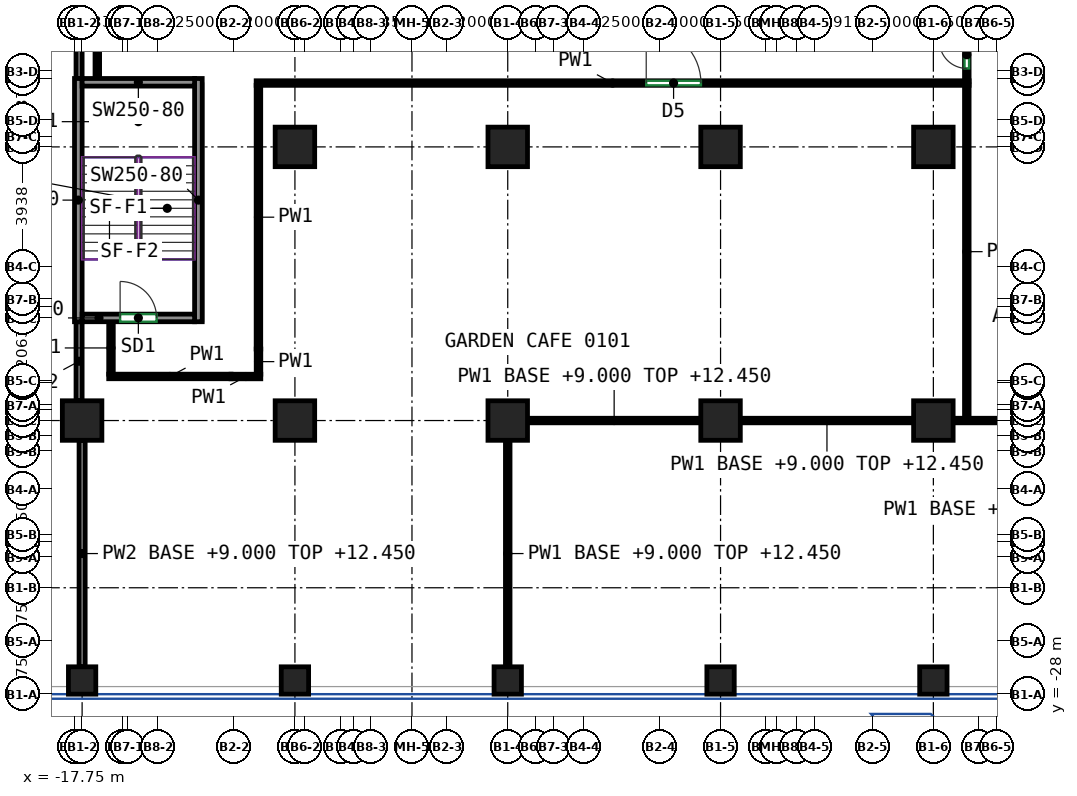
"""IFC4 building model, lengths in metres.
Left out: names, types, materials, properties, quantities, classifications, styles, units other than length and angle.
Written with IfcOpenShell. Run it as: python <this file> out.ifc"""

import sys

from ifc_helpers import new_model, si_unit, direction, frame, frame_2d, origin, origin_2d, place, context, subcontext, project, spatial, rectangle, extrude, source, transform, mapped, element, fill, save


model = new_model("IFC4")
c1 = context("Model", 3, precision=1e-05, world=origin(), true_north=direction((0.0, 1.0)))
c2 = subcontext(c1, "Body", "Model", "MODEL_VIEW")
j1 = project(units=[si_unit("LENGTHUNIT", "METRE"), si_unit("PLANEANGLEUNIT", "RADIAN")], contexts=[c1])
p1 = place(None, origin())
s1 = spatial("IfcSite", under=j1, at=p1, CompositionType="ELEMENT")
p2 = place(p1, origin())
s2 = spatial("IfcBuilding", under=s1, at=p2, CompositionType="ELEMENT")
p3 = place(p2, frame((0.0, 0.0, 9.0)))
s3 = spatial("IfcBuildingStorey", under=s2, at=p3, CompositionType="ELEMENT", Elevation=9.0)
m1 = source(origin(), c2, "Body", "SweptSolid", [
    extrude(rectangle(XDim=0.9, YDim=0.9, at=origin_2d()), origin(), (0.0, 0.0, 1.0), 4.1),
])
p4 = place(p3, frame((-17.5, -27.55, 0.0), z_axis=(0.0, 0.0, 1.0), x_axis=(1.0, 0.0, 0.0)))
e1 = element("IfcColumn", 1, at=p4, inside=s3, PredefinedType="COLUMN", context=c2, shape_type="MappedRepresentation", body=[
    mapped(m1, transform((0.0, 0.0, 0.0))),
])
m2 = source(origin(), c2, "Body", "SweptSolid", [
    extrude(rectangle(XDim=1.3, YDim=1.3, at=origin_2d()), origin(), (0.0, 0.0, 1.0), 4.1),
])
p5 = place(p3, frame((-17.5, -19.0, 0.0), z_axis=(0.0, 0.0, 1.0), x_axis=(1.0, 0.0, 0.0)))
e2 = element("IfcColumn", 2, at=p5, inside=s3, PredefinedType="COLUMN", context=c2, shape_type="MappedRepresentation", body=[
    mapped(m2, transform((0.0, 0.0, 0.0))),
])
p6 = place(p3, frame((-10.5, -27.55, 0.0), z_axis=(0.0, 0.0, 1.0), x_axis=(1.0, 0.0, 0.0)))
e3 = element("IfcColumn", 3, at=p6, inside=s3, PredefinedType="COLUMN", context=c2, shape_type="MappedRepresentation", body=[
    mapped(m1, transform((0.0, 0.0, 0.0))),
])
for number, where, z_axis, x_axis in (
    (4, (-10.5, -19.0, 0.0), (0.0, 0.0, 1.0), (1.0, 0.0, 0.0)),
    (5, (-10.5, -10.0, 0.0), (0.0, 0.0, 1.0), (1.0, 0.0, 0.0)),
):
    element("IfcColumn", number, at=place(p3, frame(where, z_axis=z_axis, x_axis=x_axis)), inside=s3, PredefinedType="COLUMN", context=c2, shape_type="MappedRepresentation", body=[
        mapped(m2, transform((0.0, 0.0, 0.0))),
    ])
p7 = place(p3, frame((-3.5, -27.55, 0.0), z_axis=(0.0, 0.0, 1.0), x_axis=(1.0, 0.0, 0.0)))
e6 = element("IfcColumn", 6, at=p7, inside=s3, PredefinedType="COLUMN", context=c2, shape_type="MappedRepresentation", body=[
    mapped(m1, transform((0.0, 0.0, 0.0))),
])
for number, where, z_axis, x_axis in (
    (7, (-3.5, -19.0, 0.0), (0.0, 0.0, 1.0), (1.0, 0.0, 0.0)),
    (8, (-3.5, -10.0, 0.0), (0.0, 0.0, 1.0), (1.0, 0.0, 0.0)),
):
    element("IfcColumn", number, at=place(p3, frame(where, z_axis=z_axis, x_axis=x_axis)), inside=s3, PredefinedType="COLUMN", context=c2, shape_type="MappedRepresentation", body=[
        mapped(m2, transform((0.0, 0.0, 0.0))),
    ])
p8 = place(p3, frame((3.5, -27.55, 0.0), z_axis=(0.0, 0.0, 1.0), x_axis=(1.0, 0.0, 0.0)))
e9 = element("IfcColumn", 9, at=p8, inside=s3, PredefinedType="COLUMN", context=c2, shape_type="MappedRepresentation", body=[
    mapped(m1, transform((0.0, 0.0, 0.0))),
])
for number, where, z_axis, x_axis in (
    (10, (3.5, -19.0, 0.0), (0.0, 0.0, 1.0), (1.0, 0.0, 0.0)),
    (11, (3.5, -10.0, 0.0), (0.0, 0.0, 1.0), (1.0, 0.0, 0.0)),
):
    element("IfcColumn", number, at=place(p3, frame(where, z_axis=z_axis, x_axis=x_axis)), inside=s3, PredefinedType="COLUMN", context=c2, shape_type="MappedRepresentation", body=[
        mapped(m2, transform((0.0, 0.0, 0.0))),
    ])
p9 = place(p3, frame((10.5, -27.55, 0.0), z_axis=(0.0, 0.0, 1.0), x_axis=(1.0, 0.0, 0.0)))
e12 = element("IfcColumn", 12, at=p9, inside=s3, PredefinedType="COLUMN", context=c2, shape_type="MappedRepresentation", body=[
    mapped(m1, transform((0.0, 0.0, 0.0))),
])
for number, where, z_axis, x_axis in (
    (13, (10.5, -19.0, 0.0), (0.0, 0.0, 1.0), (1.0, 0.0, 0.0)),
    (14, (10.5, -10.0, 0.0), (0.0, 0.0, 1.0), (1.0, 0.0, 0.0)),
):
    element("IfcColumn", number, at=place(p3, frame(where, z_axis=z_axis, x_axis=x_axis)), inside=s3, PredefinedType="COLUMN", context=c2, shape_type="MappedRepresentation", body=[
        mapped(m2, transform((0.0, 0.0, 0.0))),
    ])
m3 = source(origin(), c2, "Body", "SweptSolid", [
    extrude(rectangle(XDim=8.0, YDim=0.25, at=frame_2d((4.0, 0.0))), origin(), (0.0, 0.0, 1.0), 4.1),
])
for number, where, z_axis, x_axis in (
    (15, (-17.625, -15.75, 0.0), (0.0, 0.0, 1.0), (0.0, 1.0, 0.0)),
    (16, (-13.675, -15.75, 0.0), (0.0, 0.0, 1.0), (0.0, 1.0, 0.0)),
):
    element("IfcWall", number, at=place(p3, frame(where, z_axis=z_axis, x_axis=x_axis)), inside=s3, PredefinedType="SHEAR", context=c2, shape_type="MappedRepresentation", body=[
        mapped(m3, transform((0.0, 0.0, 0.0))),
    ])
m4 = source(origin(), c2, "Body", "SweptSolid", [
    extrude(rectangle(XDim=3.7, YDim=0.25, at=frame_2d((1.85, 0.0))), origin(), (0.0, 0.0, 1.0), 4.1),
])
p10 = place(p3, frame((-17.5, -15.625, 0.0), z_axis=(0.0, 0.0, 1.0), x_axis=(1.0, 0.0, 0.0)))
e17 = element("IfcWall", 17, at=p10, inside=s3, PredefinedType="SHEAR", context=c2, shape_type="MappedRepresentation", body=[
    mapped(m4, transform((0.0, 0.0, 0.0))),
])
p11 = place(p10, frame((1.25, 0.0, 0.0)))
e18 = element("IfcOpeningElement", 18, at=p11, cuts=e17, PredefinedType="OPENING", context=c2, shape_type="SweptSolid", body=[
    extrude(rectangle(XDim=1.2, YDim=2.1, at=frame_2d((0.6, 1.05))), frame((0.0, 0.135, 0.0), z_axis=(0.0, -1.0, 0.0), x_axis=(1.0, 0.0, 0.0)), (0.0, 0.0, 1.0), 0.27),
])
p12 = place(p3, frame((-17.5, -7.875, 0.0), z_axis=(0.0, 0.0, 1.0), x_axis=(1.0, 0.0, 0.0)))
e19 = element("IfcWall", 19, at=p12, inside=s3, PredefinedType="SHEAR", context=c2, shape_type="MappedRepresentation", body=[
    mapped(m4, transform((0.0, 0.0, 0.0))),
])
p13 = place(p3, frame((-3.5, -27.1, 0.0), z_axis=(0.0, 0.0, 1.0), x_axis=(0.0, 1.0, 0.0)))
e20 = element("IfcWall", 20, at=p13, inside=s3, PredefinedType="PARTITIONING", context=c2, shape_type="SweptSolid", body=[
    extrude(rectangle(XDim=7.45, YDim=0.15, at=frame_2d((3.725, 0.0))), origin(), (0.0, 0.0, 1.0), 3.45),
])
for number, where, z_axis, x_axis in (
    (21, (-2.85, -19.0, 0.0), (0.0, 0.0, 1.0), (1.0, 0.0, 0.0)),
    (22, (4.15, -19.0, 0.0), (0.0, 0.0, 1.0), (1.0, 0.0, 0.0)),
    (23, (11.15, -19.0, 0.0), (0.0, 0.0, 1.0), (1.0, 0.0, 0.0)),
):
    element("IfcWall", number, at=place(p3, frame(where, z_axis=z_axis, x_axis=x_axis)), inside=s3, PredefinedType="PARTITIONING", context=c2, shape_type="SweptSolid", body=[
        extrude(rectangle(XDim=5.7, YDim=0.15, at=frame_2d((2.85, 0.0))), origin(), (0.0, 0.0, 1.0), 3.45),
    ])
p14 = place(p3, frame((11.6, -7.835, 0.0), z_axis=(0.0, 0.0, 1.0), x_axis=(0.0, 1.0, 0.0)))
e24 = element("IfcWall", 24, at=p14, inside=s3, PredefinedType="PARTITIONING", context=c2, shape_type="SweptSolid", body=[
    extrude(rectangle(XDim=2.27, YDim=0.15, at=frame_2d((1.135, 0.0))), origin(), (0.0, 0.0, 1.0), 4.1),
])
p15 = place(p14, frame((0.416, 0.0, 0.0)))
e25 = element("IfcOpeningElement", 25, at=p15, cuts=e24, PredefinedType="OPENING", context=c2, shape_type="SweptSolid", body=[
    extrude(rectangle(XDim=0.9, YDim=2.1, at=frame_2d((0.45, 1.05))), frame((0.0, 0.085, 0.0), z_axis=(0.0, -1.0, 0.0), x_axis=(1.0, 0.0, 0.0)), (0.0, 0.0, 1.0), 0.17),
])
p16 = place(p3, frame((11.6, -18.925, 0.0), z_axis=(0.0, 0.0, 1.0), x_axis=(0.0, 1.0, 0.0)))
e26 = element("IfcWall", 26, at=p16, inside=s3, PredefinedType="PARTITIONING", context=c2, shape_type="SweptSolid", body=[
    extrude(rectangle(XDim=10.959, YDim=0.15, at=frame_2d((5.479, 0.0))), origin(), (0.0, 0.0, 1.0), 4.1),
])
p17 = place(p3, frame((-16.625, -17.55, 0.0), z_axis=(0.0, 0.0, 1.0), x_axis=(1.0, 0.0, 0.0)))
e27 = element("IfcWall", 27, at=p17, inside=s3, PredefinedType="PARTITIONING", context=c2, shape_type="SweptSolid", body=[
    extrude(rectangle(XDim=4.023, YDim=0.15, at=frame_2d((2.011, 0.0))), origin(), (0.0, 0.0, 1.0), 4.1),
])
p18 = place(p3, frame((-16.55, -15.75, 0.0), z_axis=(0.0, 0.0, 1.0), x_axis=(0.0, -1.0, 0.0)))
e28 = element("IfcWall", 28, at=p18, inside=s3, PredefinedType="PARTITIONING", context=c2, shape_type="SweptSolid", body=[
    extrude(rectangle(XDim=1.725, YDim=0.15, at=frame_2d((0.863, 0.0))), origin(), (0.0, 0.0, 1.0), 4.1),
])
p19 = place(p3, frame((-11.775, -7.9, 0.0), z_axis=(0.0, 0.0, 1.0), x_axis=(1.0, 0.0, 0.0)))
e29 = element("IfcWall", 29, at=p19, inside=s3, PredefinedType="PARTITIONING", context=c2, shape_type="SweptSolid", body=[
    extrude(rectangle(XDim=23.45, YDim=0.15, at=frame_2d((11.725, 0.0))), origin(), (0.0, 0.0, 1.0), 4.1),
])
p20 = place(p19, frame((12.83, 0.0, 0.0)))
e30 = element("IfcOpeningElement", 30, at=p20, cuts=e29, PredefinedType="OPENING", context=c2, shape_type="SweptSolid", body=[
    extrude(rectangle(XDim=1.8, YDim=2.1, at=frame_2d((0.9, 1.05))), frame((0.0, 0.085, 0.0), z_axis=(0.0, -1.0, 0.0), x_axis=(1.0, 0.0, 0.0)), (0.0, 0.0, 1.0), 0.17),
])
p21 = place(p3, frame((-11.7, -16.648, 0.0), z_axis=(0.0, 0.0, 1.0), x_axis=(0.0, 1.0, 0.0)))
e31 = element("IfcWall", 31, at=p21, inside=s3, PredefinedType="PARTITIONING", context=c2, shape_type="SweptSolid", body=[
    extrude(rectangle(XDim=8.673, YDim=0.15, at=frame_2d((4.336, 0.0))), origin(), (0.0, 0.0, 1.0), 4.1),
])
p22 = place(p3, frame((-11.698, -17.477, 0.0), z_axis=(0.0, 0.0, 1.0), x_axis=(0.0, 1.0, 0.0)))
e32 = element("IfcWall", 32, at=p22, inside=s3, PredefinedType="PARTITIONING", context=c2, shape_type="SweptSolid", body=[
    extrude(rectangle(XDim=0.829, YDim=0.15, at=frame_2d((0.415, 0.0))), origin(), (0.0, 0.0, 1.0), 4.1),
])
p23 = place(p3, frame((-12.602, -17.552, 0.0), z_axis=(0.0, 0.0, 1.0), x_axis=(1.0, 0.0, 0.0)))
e33 = element("IfcWall", 33, at=p23, inside=s3, PredefinedType="PARTITIONING", context=c2, shape_type="SweptSolid", body=[
    extrude(rectangle(XDim=0.979, YDim=0.15, at=frame_2d((0.49, 0.0))), origin(), (0.0, 0.0, 1.0), 4.1),
])
p24 = place(p3, frame((-17.0, -5.575, 0.0), z_axis=(0.0, 0.0, 1.0), x_axis=(0.0, -1.0, 0.0)))
e34 = element("IfcWall", 34, at=p24, inside=s3, PredefinedType="PARTITIONING", context=c2, shape_type="SweptSolid", body=[
    extrude(rectangle(XDim=2.175, YDim=0.15, at=frame_2d((1.087, 0.0))), origin(), (0.0, 0.0, 1.0), 4.1),
])
p25 = place(p3, frame((-17.6, -18.35, 0.0), z_axis=(0.0, 0.0, 1.0), x_axis=(0.0, 1.0, 0.0)))
e35 = element("IfcWall", 35, at=p25, inside=s3, PredefinedType="PARTITIONING", context=c2, shape_type="SweptSolid", body=[
    extrude(rectangle(XDim=2.6, YDim=0.2, at=frame_2d((1.3, 0.0))), origin(), (0.0, 0.0, 1.0), 4.1),
])
p26 = place(p3, frame((-17.5, -27.1, 0.0), z_axis=(0.0, 0.0, 1.0), x_axis=(0.0, 1.0, 0.0)))
e36 = element("IfcWall", 36, at=p26, inside=s3, PredefinedType="PARTITIONING", context=c2, shape_type="SweptSolid", body=[
    extrude(rectangle(XDim=7.45, YDim=0.2, at=frame_2d((3.725, 0.0))), origin(), (0.0, 0.0, 1.0), 3.45),
])
p27 = place(p3, frame((-17.6, -7.75, 0.0), z_axis=(0.0, 0.0, 1.0), x_axis=(0.0, 1.0, 0.0)))
e37 = element("IfcWall", 37, at=p27, inside=s3, PredefinedType="PARTITIONING", context=c2, shape_type="SweptSolid", body=[
    extrude(rectangle(XDim=6.1, YDim=0.2, at=frame_2d((3.05, 0.0))), origin(), (0.0, 0.0, 1.0), 4.1),
])
p28 = place(p11, origin())
e38 = element("IfcDoor", 38, at=p28, inside=s3, OperationType="DOUBLE_DOOR_SINGLE_SWING", PredefinedType="DOOR", context=c2, shape_type="SweptSolid", body=[
    extrude(rectangle(XDim=1.2, YDim=2.1, at=frame_2d((0.6, 1.05))), frame((0.0, 0.025, 0.0), z_axis=(0.0, -1.0, 0.0), x_axis=(1.0, 0.0, 0.0)), (0.0, 0.0, 1.0), 0.05),
])
fill(e18, e38)
p29 = place(p20, origin())
e39 = element("IfcDoor", 39, at=p29, inside=s3, OperationType="DOUBLE_DOOR_SINGLE_SWING", PredefinedType="DOOR", context=c2, shape_type="SweptSolid", body=[
    extrude(rectangle(XDim=1.8, YDim=2.1, at=frame_2d((0.9, 1.05))), frame((0.0, 0.025, 0.0), z_axis=(0.0, -1.0, 0.0), x_axis=(1.0, 0.0, 0.0)), (0.0, 0.0, 1.0), 0.05),
])
fill(e30, e39)
p30 = place(p15, origin())
e40 = element("IfcDoor", 40, at=p30, inside=s3, OperationType="SINGLE_SWING_RIGHT", PredefinedType="DOOR", context=c2, shape_type="SweptSolid", body=[
    extrude(rectangle(XDim=0.9, YDim=2.1, at=frame_2d((0.45, 1.05))), frame((0.0, 0.025, 0.0), z_axis=(0.0, -1.0, 0.0), x_axis=(1.0, 0.0, 0.0)), (0.0, 0.0, 1.0), 0.05),
])
fill(e25, e40)
save(model, sys.argv[1])
